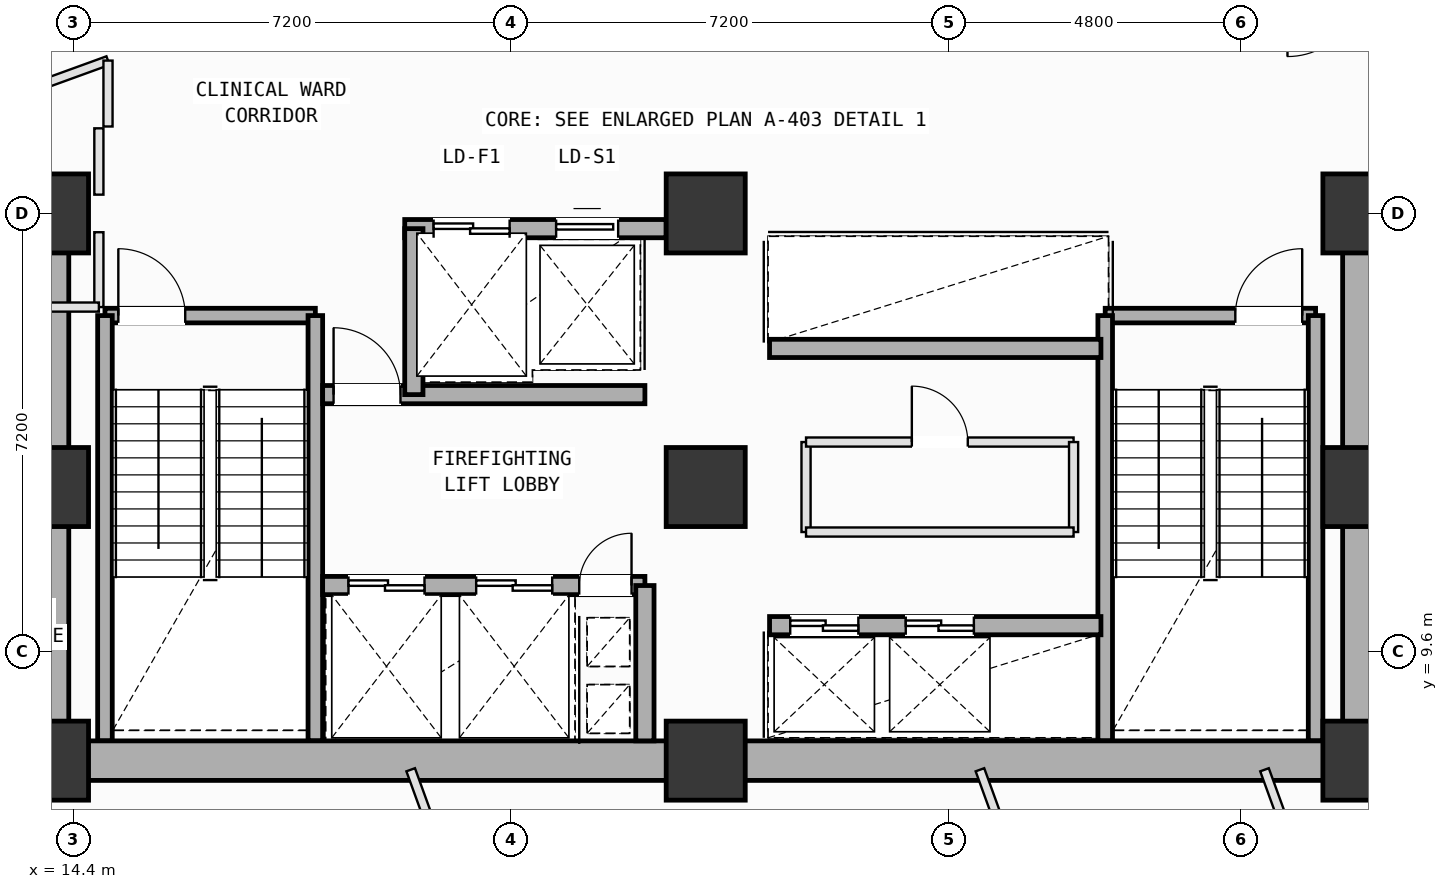
"""IFC4 building model, lengths in metres.
Left out: names, types, materials, properties, quantities, classifications, styles, units other than length and angle.
Written with IfcOpenShell. Run it as: python <this file> out.ifc"""

import sys

from ifc_helpers import new_model, si_unit, direction, frame, frame_2d, origin, origin_2d, place, context, subcontext, project, spatial, rectangle, extrude, element, fill, save


model = new_model("IFC4")
c1 = context("Model", 3, precision=1e-05, world=origin(), true_north=direction((0.0, 1.0)))
c2 = subcontext(c1, "Body", "Model", "MODEL_VIEW")
j1 = project(units=[si_unit("LENGTHUNIT", "METRE"), si_unit("PLANEANGLEUNIT", "RADIAN")], contexts=[c1])
p1 = place(None, origin())
s1 = spatial("IfcSite", under=j1, at=p1, CompositionType="ELEMENT")
p2 = place(p1, origin())
s2 = spatial("IfcBuilding", under=s1, at=p2, CompositionType="ELEMENT")
p3 = place(p2, frame((0.0, 0.0, 108.4)))
s3 = spatial("IfcBuildingStorey", under=s2, at=p3, CompositionType="ELEMENT", Elevation=108.4)
for number, where, z_axis, x_axis in (
    (1, (14.0, 7.8, 0.0), (0.0, 0.0, 1.0), (1.0, 0.0, 0.0)),
    (2, (14.0, 12.3, 0.0), (0.0, 0.0, 1.0), (1.0, 0.0, 0.0)),
    (3, (14.0, 16.8, 0.0), (0.0, 0.0, 1.0), (1.0, 0.0, 0.0)),
    (4, (24.8, 7.8, 0.0), (0.0, 0.0, 1.0), (1.0, 0.0, 0.0)),
    (5, (24.8, 12.3, 0.0), (0.0, 0.0, 1.0), (1.0, 0.0, 0.0)),
    (6, (24.8, 16.8, 0.0), (0.0, 0.0, 1.0), (1.0, 0.0, 0.0)),
    (7, (35.6, 7.8, 0.0), (0.0, 0.0, 1.0), (1.0, 0.0, 0.0)),
    (8, (35.6, 12.3, 0.0), (0.0, 0.0, 1.0), (1.0, 0.0, 0.0)),
    (9, (35.6, 16.8, 0.0), (0.0, 0.0, 1.0), (1.0, 0.0, 0.0)),
):
    element("IfcColumn", number, at=place(p3, frame(where, z_axis=z_axis, x_axis=x_axis)), inside=s3, PredefinedType="COLUMN", context=c2, shape_type="SweptSolid", body=[
        extrude(rectangle(XDim=1.3, YDim=1.3, at=origin_2d()), origin(), (0.0, 0.0, 1.0), 4.0),
    ])
p4 = place(p3, frame((14.92, 15.12, 0.0), z_axis=(0.0, 0.0, 1.0), x_axis=(1.0, 0.0, 0.0)))
e10 = element("IfcWall", 10, at=p4, inside=s3, PredefinedType="SOLIDWALL", context=c2, shape_type="SweptSolid", body=[
    extrude(rectangle(XDim=3.46, YDim=0.24, at=frame_2d((1.73, 0.0))), origin(), (0.0, 0.0, 1.0), 3.78),
])
p5 = place(p4, frame((0.22, 0.0, 0.0)))
e11 = element("IfcOpeningElement", 11, at=p5, cuts=e10, PredefinedType="OPENING", context=c2, shape_type="SweptSolid", body=[
    extrude(rectangle(XDim=1.1, YDim=2.15, at=frame_2d((0.55, 1.075))), frame((0.0, 0.13, 0.0), z_axis=(0.0, -1.0, 0.0), x_axis=(1.0, 0.0, 0.0)), (0.0, 0.0, 1.0), 0.26),
])
for number, where, z_axis, x_axis in (
    (12, (18.38, 15.12, 0.0), (0.0, 0.0, 1.0), (0.0, -1.0, 0.0)),
    (13, (14.92, 8.125, 0.0), (0.0, 0.0, 1.0), (0.0, 1.0, 0.0)),
):
    element("IfcWall", number, at=place(p3, frame(where, z_axis=z_axis, x_axis=x_axis)), inside=s3, PredefinedType="SOLIDWALL", context=c2, shape_type="SweptSolid", body=[
        extrude(rectangle(XDim=6.995, YDim=0.24, at=frame_2d((3.498, 0.0))), origin(), (0.0, 0.0, 1.0), 3.78),
    ])
p6 = place(p3, frame((31.37, 15.12, 0.0), z_axis=(0.0, 0.0, 1.0), x_axis=(1.0, 0.0, 0.0)))
e14 = element("IfcWall", 14, at=p6, inside=s3, PredefinedType="SOLIDWALL", context=c2, shape_type="SweptSolid", body=[
    extrude(rectangle(XDim=3.46, YDim=0.24, at=frame_2d((1.73, 0.0))), origin(), (0.0, 0.0, 1.0), 3.78),
])
p7 = place(p6, frame((2.14, 0.0, 0.0)))
e15 = element("IfcOpeningElement", 15, at=p7, cuts=e14, PredefinedType="OPENING", context=c2, shape_type="SweptSolid", body=[
    extrude(rectangle(XDim=1.1, YDim=2.15, at=frame_2d((0.55, 1.075))), frame((0.0, 0.13, 0.0), z_axis=(0.0, -1.0, 0.0), x_axis=(1.0, 0.0, 0.0)), (0.0, 0.0, 1.0), 0.26),
])
for number, where, z_axis, x_axis in (
    (16, (34.83, 15.12, 0.0), (0.0, 0.0, 1.0), (0.0, -1.0, 0.0)),
    (17, (31.37, 8.125, 0.0), (0.0, 0.0, 1.0), (0.0, 1.0, 0.0)),
):
    element("IfcWall", number, at=place(p3, frame(where, z_axis=z_axis, x_axis=x_axis)), inside=s3, PredefinedType="SOLIDWALL", context=c2, shape_type="SweptSolid", body=[
        extrude(rectangle(XDim=6.995, YDim=0.24, at=frame_2d((3.498, 0.0))), origin(), (0.0, 0.0, 1.0), 3.78),
    ])
for number, where, z_axis, x_axis in (
    (18, (14.0, 7.8, 0.0), (0.0, 0.0, 1.0), (1.0, 0.0, 0.0)),
    (19, (24.8, 7.8, 0.0), (0.0, 0.0, 1.0), (1.0, 0.0, 0.0)),
):
    element("IfcWall", number, at=place(p3, frame(where, z_axis=z_axis, x_axis=x_axis)), inside=s3, PredefinedType="SHEAR", context=c2, shape_type="SweptSolid", body=[
        extrude(rectangle(XDim=10.8, YDim=0.65, at=frame_2d((5.4, 0.0))), origin(), (0.0, 0.0, 1.0), 3.78),
    ])
for number, where, z_axis, x_axis in (
    (20, (35.6, 7.8, 0.0), (0.0, 0.0, 1.0), (0.0, 1.0, 0.0)),
    (21, (14.0, 16.8, 0.0), (0.0, 0.0, 1.0), (0.0, -1.0, 0.0)),
):
    element("IfcWall", number, at=place(p3, frame(where, z_axis=z_axis, x_axis=x_axis)), inside=s3, PredefinedType="SHEAR", context=c2, shape_type="SweptSolid", body=[
        extrude(rectangle(XDim=9.0, YDim=0.65, at=frame_2d((4.5, 0.0))), origin(), (0.0, 0.0, 1.0), 3.78),
    ])
p8 = place(p3, frame((19.85, 16.55, 0.0), z_axis=(0.0, 0.0, 1.0), x_axis=(1.0, 0.0, 0.0)))
e22 = element("IfcWall", 22, at=p8, inside=s3, PredefinedType="SOLIDWALL", context=c2, shape_type="SweptSolid", body=[
    extrude(rectangle(XDim=4.3, YDim=0.3, at=frame_2d((2.15, 0.0))), origin(), (0.0, 0.0, 1.0), 3.78),
])
p9 = place(p8, frame((0.475, 0.0, 0.0)))
e23 = element("IfcOpeningElement", 23, at=p9, cuts=e22, PredefinedType="OPENING", context=c2, shape_type="SweptSolid", body=[
    extrude(rectangle(XDim=1.25, YDim=2.18, at=frame_2d((0.625, 1.09))), frame((0.0, 0.16, 0.0), z_axis=(0.0, -1.0, 0.0), x_axis=(1.0, 0.0, 0.0)), (0.0, 0.0, 1.0), 0.32),
])
p10 = place(p8, frame((2.49, 0.0, 0.0)))
e24 = element("IfcOpeningElement", 24, at=p10, cuts=e22, PredefinedType="OPENING", context=c2, shape_type="SweptSolid", body=[
    extrude(rectangle(XDim=1.02, YDim=2.12, at=frame_2d((0.51, 1.06))), frame((0.0, 0.16, 0.0), z_axis=(0.0, -1.0, 0.0), x_axis=(1.0, 0.0, 0.0)), (0.0, 0.0, 1.0), 0.32),
])
p11 = place(p3, frame((18.5, 10.68, 0.0), z_axis=(0.0, 0.0, 1.0), x_axis=(1.0, 0.0, 0.0)))
e25 = element("IfcWall", 25, at=p11, inside=s3, PredefinedType="SOLIDWALL", context=c2, shape_type="SweptSolid", body=[
    extrude(rectangle(XDim=5.3, YDim=0.3, at=frame_2d((2.65, 0.0))), origin(), (0.0, 0.0, 1.0), 3.78),
])
p12 = place(p11, frame((4.22, 0.0, 0.0)))
e26 = element("IfcOpeningElement", 26, at=p12, cuts=e25, PredefinedType="OPENING", context=c2, shape_type="SweptSolid", body=[
    extrude(rectangle(XDim=0.86, YDim=2.06, at=frame_2d((0.43, 1.03))), frame((0.0, 0.16, 0.0), z_axis=(0.0, -1.0, 0.0), x_axis=(1.0, 0.0, 0.0)), (0.0, 0.0, 1.0), 0.32),
])
p13 = place(p11, frame((0.425, 0.0, 0.0)))
e27 = element("IfcOpeningElement", 27, at=p13, cuts=e25, PredefinedType="OPENING", context=c2, shape_type="SweptSolid", body=[
    extrude(rectangle(XDim=1.25, YDim=2.18, at=frame_2d((0.625, 1.09))), frame((0.0, 0.16, 0.0), z_axis=(0.0, -1.0, 0.0), x_axis=(1.0, 0.0, 0.0)), (0.0, 0.0, 1.0), 0.32),
])
p14 = place(p11, frame((2.525, 0.0, 0.0)))
e28 = element("IfcOpeningElement", 28, at=p14, cuts=e25, PredefinedType="OPENING", context=c2, shape_type="SweptSolid", body=[
    extrude(rectangle(XDim=1.25, YDim=2.18, at=frame_2d((0.625, 1.09))), frame((0.0, 0.16, 0.0), z_axis=(0.0, -1.0, 0.0), x_axis=(1.0, 0.0, 0.0)), (0.0, 0.0, 1.0), 0.32),
])
p15 = place(p3, frame((18.5, 13.82, 0.0), z_axis=(0.0, 0.0, 1.0), x_axis=(1.0, 0.0, 0.0)))
e29 = element("IfcWall", 29, at=p15, inside=s3, PredefinedType="SOLIDWALL", context=c2, shape_type="SweptSolid", body=[
    extrude(rectangle(XDim=5.3, YDim=0.3, at=frame_2d((2.65, 0.0))), origin(), (0.0, 0.0, 1.0), 3.78),
])
p16 = place(p15, frame((0.18, 0.0, 0.0)))
e30 = element("IfcOpeningElement", 30, at=p16, cuts=e29, PredefinedType="OPENING", context=c2, shape_type="SweptSolid", body=[
    extrude(rectangle(XDim=1.1, YDim=2.15, at=frame_2d((0.55, 1.075))), frame((0.0, 0.16, 0.0), z_axis=(0.0, -1.0, 0.0), x_axis=(1.0, 0.0, 0.0)), (0.0, 0.0, 1.0), 0.32),
])
p17 = place(p3, frame((23.8, 8.125, 0.0), z_axis=(0.0, 0.0, 1.0), x_axis=(0.0, 1.0, 0.0)))
e31 = element("IfcWall", 31, at=p17, inside=s3, PredefinedType="SOLIDWALL", context=c2, shape_type="SweptSolid", body=[
    extrude(rectangle(XDim=2.555, YDim=0.3, at=frame_2d((1.277, 0.0))), origin(), (0.0, 0.0, 1.0), 3.78),
])
p18 = place(p3, frame((20.0, 13.82, 0.0), z_axis=(0.0, 0.0, 1.0), x_axis=(0.0, 1.0, 0.0)))
e32 = element("IfcWall", 32, at=p18, inside=s3, PredefinedType="SOLIDWALL", context=c2, shape_type="SweptSolid", body=[
    extrude(rectangle(XDim=2.73, YDim=0.3, at=frame_2d((1.365, 0.0))), origin(), (0.0, 0.0, 1.0), 3.78),
])
p19 = place(p3, frame((25.85, 10.02, 0.0), z_axis=(0.0, 0.0, 1.0), x_axis=(1.0, 0.0, 0.0)))
e33 = element("IfcWall", 33, at=p19, inside=s3, PredefinedType="SOLIDWALL", context=c2, shape_type="SweptSolid", body=[
    extrude(rectangle(XDim=5.45, YDim=0.3, at=frame_2d((2.725, 0.0))), origin(), (0.0, 0.0, 1.0), 3.78),
])
p20 = place(p19, frame((0.34, 0.0, 0.0)))
e34 = element("IfcOpeningElement", 34, at=p20, cuts=e33, PredefinedType="OPENING", context=c2, shape_type="SweptSolid", body=[
    extrude(rectangle(XDim=1.12, YDim=2.15, at=frame_2d((0.56, 1.075))), frame((0.0, 0.16, 0.0), z_axis=(0.0, -1.0, 0.0), x_axis=(1.0, 0.0, 0.0)), (0.0, 0.0, 1.0), 0.32),
])
p21 = place(p19, frame((2.24, 0.0, 0.0)))
e35 = element("IfcOpeningElement", 35, at=p21, cuts=e33, PredefinedType="OPENING", context=c2, shape_type="SweptSolid", body=[
    extrude(rectangle(XDim=1.12, YDim=2.15, at=frame_2d((0.56, 1.075))), frame((0.0, 0.16, 0.0), z_axis=(0.0, -1.0, 0.0), x_axis=(1.0, 0.0, 0.0)), (0.0, 0.0, 1.0), 0.32),
])
p22 = place(p3, frame((25.85, 14.58, 0.0), z_axis=(0.0, 0.0, 1.0), x_axis=(1.0, 0.0, 0.0)))
e36 = element("IfcWall", 36, at=p22, inside=s3, PredefinedType="SOLIDWALL", context=c2, shape_type="SweptSolid", body=[
    extrude(rectangle(XDim=5.45, YDim=0.3, at=frame_2d((2.725, 0.0))), origin(), (0.0, 0.0, 1.0), 3.78),
])
p23 = place(p3, frame((26.45, 11.56, 0.0), z_axis=(0.0, 0.0, 1.0), x_axis=(0.0, 1.0, 0.0)))
e37 = element("IfcWall", 37, at=p23, inside=s3, PredefinedType="PARTITIONING", context=c2, shape_type="SweptSolid", body=[
    extrude(rectangle(XDim=1.48, YDim=0.15, at=frame_2d((0.74, 0.0))), origin(), (0.0, 0.0, 1.0), 3.78),
])
p24 = place(p3, frame((26.45, 13.04, 0.0), z_axis=(0.0, 0.0, 1.0), x_axis=(1.0, 0.0, 0.0)))
e38 = element("IfcWall", 38, at=p24, inside=s3, PredefinedType="PARTITIONING", context=c2, shape_type="SweptSolid", body=[
    extrude(rectangle(XDim=4.4, YDim=0.15, at=frame_2d((2.2, 0.0))), origin(), (0.0, 0.0, 1.0), 3.78),
])
p25 = place(p24, frame((1.74, 0.0, 0.0)))
e39 = element("IfcOpeningElement", 39, at=p25, cuts=e38, PredefinedType="OPENING", context=c2, shape_type="SweptSolid", body=[
    extrude(rectangle(XDim=0.92, YDim=2.1, at=frame_2d((0.46, 1.05))), frame((0.0, 0.085, 0.0), z_axis=(0.0, -1.0, 0.0), x_axis=(1.0, 0.0, 0.0)), (0.0, 0.0, 1.0), 0.17),
])
p26 = place(p3, frame((30.85, 13.04, 0.0), z_axis=(0.0, 0.0, 1.0), x_axis=(0.0, -1.0, 0.0)))
e40 = element("IfcWall", 40, at=p26, inside=s3, PredefinedType="PARTITIONING", context=c2, shape_type="SweptSolid", body=[
    extrude(rectangle(XDim=1.48, YDim=0.15, at=frame_2d((0.74, 0.0))), origin(), (0.0, 0.0, 1.0), 3.78),
])
p27 = place(p3, frame((30.85, 11.56, 0.0), z_axis=(0.0, 0.0, 1.0), x_axis=(-1.0, 0.0, 0.0)))
e41 = element("IfcWall", 41, at=p27, inside=s3, PredefinedType="PARTITIONING", context=c2, shape_type="SweptSolid", body=[
    extrude(rectangle(XDim=4.4, YDim=0.15, at=frame_2d((2.2, 0.0))), origin(), (0.0, 0.0, 1.0), 3.78),
])
p28 = place(p3, frame((19.948, 7.65, 0.0), z_axis=(0.0, 0.0, 1.0), x_axis=(0.341159632503, -0.940005375065, 0.0)))
e42 = element("IfcWall", 42, at=p28, inside=s3, PredefinedType="PARTITIONING", context=c2, shape_type="SweptSolid", body=[
    extrude(rectangle(XDim=10.652, YDim=0.15, at=frame_2d((5.326, 0.0))), origin(), (0.0, 0.0, 1.0), 3.78),
])
p29 = place(p3, frame((29.31, 7.65, 0.0), z_axis=(0.0, 0.0, 1.0), x_axis=(0.341041356656, -0.940048292935, 0.0)))
e43 = element("IfcWall", 43, at=p29, inside=s3, PredefinedType="PARTITIONING", context=c2, shape_type="SweptSolid", body=[
    extrude(rectangle(XDim=7.823, YDim=0.15, at=frame_2d((3.912, 0.0))), origin(), (0.0, 0.0, 1.0), 3.78),
])
p30 = place(p29, frame((3.641, 0.0, 0.0)))
e44 = element("IfcOpeningElement", 44, at=p30, cuts=e43, PredefinedType="OPENING", context=c2, shape_type="SweptSolid", body=[
    extrude(rectangle(XDim=0.86, YDim=2.06, at=frame_2d((0.43, 1.03))), frame((0.0, 0.085, 0.0), z_axis=(0.0, -1.0, 0.0), x_axis=(1.0, 0.0, 0.0)), (0.0, 0.0, 1.0), 0.17),
])
p31 = place(p3, frame((33.99, 7.65, 0.0), z_axis=(0.0, 0.0, 1.0), x_axis=(0.341261367951, -0.939968445611, 0.0)))
e45 = element("IfcWall", 45, at=p31, inside=s3, PredefinedType="PARTITIONING", context=c2, shape_type="SweptSolid", body=[
    extrude(rectangle(XDim=5.861, YDim=0.15, at=frame_2d((2.93, 0.0))), origin(), (0.0, 0.0, 1.0), 3.78),
])
p32 = place(p31, frame((2.66, 0.0, 0.0)))
e46 = element("IfcOpeningElement", 46, at=p32, cuts=e45, PredefinedType="OPENING", context=c2, shape_type="SweptSolid", body=[
    extrude(rectangle(XDim=0.86, YDim=2.06, at=frame_2d((0.43, 1.03))), frame((0.0, 0.085, 0.0), z_axis=(0.0, -1.0, 0.0), x_axis=(1.0, 0.0, 0.0)), (0.0, 0.0, 1.0), 0.17),
])
p33 = place(p3, frame((35.6, 7.5, 0.0), z_axis=(0.0, 0.0, 1.0), x_axis=(1.0, 0.0, 0.0)))
e47 = element("IfcWall", 47, at=p33, inside=s3, PredefinedType="PARTITIONING", context=c2, shape_type="SweptSolid", body=[
    extrude(rectangle(XDim=0.55, YDim=0.15, at=frame_2d((0.275, 0.0))), origin(), (0.0, 0.0, 1.0), 2.965),
])
p34 = place(p3, frame((35.631, 16.494, 0.0), z_axis=(0.0, 0.0, 1.0), x_axis=(0.999975329499, 0.007024271772, 0.0)))
e48 = element("IfcWall", 48, at=p34, inside=s3, PredefinedType="PARTITIONING", context=c2, shape_type="SweptSolid", body=[
    extrude(rectangle(XDim=0.869, YDim=0.15, at=frame_2d((0.435, 0.0))), origin(), (0.0, 0.0, 1.0), 2.965),
])
p35 = place(p3, frame((14.82, 18.2, 0.0), z_axis=(0.0, 0.0, 1.0), x_axis=(0.0, -1.0, 0.0)))
e49 = element("IfcWall", 49, at=p35, inside=s3, PredefinedType="PARTITIONING", context=c2, shape_type="SweptSolid", body=[
    extrude(rectangle(XDim=1.091, YDim=0.15, at=frame_2d((0.545, 0.0))), origin(), (0.0, 0.0, 1.0), 3.78),
])
p36 = place(p3, frame((14.82, 16.491, 0.0), z_axis=(0.0, 0.0, 1.0), x_axis=(0.0, -1.0, 0.0)))
e50 = element("IfcWall", 50, at=p36, inside=s3, PredefinedType="PARTITIONING", context=c2, shape_type="SweptSolid", body=[
    extrude(rectangle(XDim=1.231, YDim=0.15, at=frame_2d((0.615, 0.0))), origin(), (0.0, 0.0, 1.0), 3.78),
])
p37 = place(p3, frame((14.82, 15.26, 0.0), z_axis=(0.0, 0.0, 1.0), x_axis=(-1.0, 0.0, 0.0)))
e51 = element("IfcWall", 51, at=p37, inside=s3, PredefinedType="PARTITIONING", context=c2, shape_type="SweptSolid", body=[
    extrude(rectangle(XDim=1.12, YDim=0.15, at=frame_2d((0.56, 0.0))), origin(), (0.0, 0.0, 1.0), 3.78),
])
p38 = place(p3, frame((7.515, 16.608, 0.0), z_axis=(0.0, 0.0, 1.0), x_axis=(0.939990996675, 0.341199247025, 0.0)))
e52 = element("IfcWall", 52, at=p38, inside=s3, PredefinedType="PARTITIONING", context=c2, shape_type="SweptSolid", body=[
    extrude(rectangle(XDim=7.931, YDim=0.15, at=frame_2d((3.965, 0.0))), origin(), (0.0, 0.0, 1.0), 3.78),
])
p39 = place(p38, frame((3.365, 0.0, 0.0)))
e53 = element("IfcOpeningElement", 53, at=p39, cuts=e52, PredefinedType="OPENING", context=c2, shape_type="SweptSolid", body=[
    extrude(rectangle(XDim=1.2, YDim=2.15, at=frame_2d((0.6, 1.075))), frame((0.0, 0.085, 0.0), z_axis=(0.0, -1.0, 0.0), x_axis=(1.0, 0.0, 0.0)), (0.0, 0.0, 1.0), 0.17),
])
p40 = place(p3, frame((14.97, 19.314, 0.0), z_axis=(0.0, 0.0, 1.0), x_axis=(0.0, -1.0, 0.0)))
e54 = element("IfcWall", 54, at=p40, inside=s3, PredefinedType="PARTITIONING", context=c2, shape_type="SweptSolid", body=[
    extrude(rectangle(XDim=1.084, YDim=0.15, at=frame_2d((0.542, 0.0))), origin(), (0.0, 0.0, 1.0), 3.78),
])
p41 = place(p5, origin())
e55 = element("IfcDoor", 55, at=p41, inside=s3, OperationType="SINGLE_SWING_LEFT", PredefinedType="DOOR", context=c2, shape_type="SweptSolid", body=[
    extrude(rectangle(XDim=1.1, YDim=2.15, at=frame_2d((0.55, 1.075))), frame((0.0, 0.025, 0.0), z_axis=(0.0, -1.0, 0.0), x_axis=(1.0, 0.0, 0.0)), (0.0, 0.0, 1.0), 0.05),
])
fill(e11, e55)
p42 = place(p7, origin())
e56 = element("IfcDoor", 56, at=p42, inside=s3, OperationType="SINGLE_SWING_RIGHT", PredefinedType="DOOR", context=c2, shape_type="SweptSolid", body=[
    extrude(rectangle(XDim=1.1, YDim=2.15, at=frame_2d((0.55, 1.075))), frame((0.0, 0.025, 0.0), z_axis=(0.0, -1.0, 0.0), x_axis=(1.0, 0.0, 0.0)), (0.0, 0.0, 1.0), 0.05),
])
fill(e15, e56)
p43 = place(p12, origin())
e57 = element("IfcDoor", 57, at=p43, inside=s3, OperationType="SINGLE_SWING_RIGHT", PredefinedType="DOOR", context=c2, shape_type="SweptSolid", body=[
    extrude(rectangle(XDim=0.86, YDim=2.06, at=frame_2d((0.43, 1.03))), frame((0.0, 0.025, 0.0), z_axis=(0.0, -1.0, 0.0), x_axis=(1.0, 0.0, 0.0)), (0.0, 0.0, 1.0), 0.05),
])
fill(e26, e57)
p44 = place(p16, origin())
e58 = element("IfcDoor", 58, at=p44, inside=s3, OperationType="SINGLE_SWING_LEFT", PredefinedType="DOOR", context=c2, shape_type="SweptSolid", body=[
    extrude(rectangle(XDim=1.1, YDim=2.15, at=frame_2d((0.55, 1.075))), frame((0.0, 0.025, 0.0), z_axis=(0.0, -1.0, 0.0), x_axis=(1.0, 0.0, 0.0)), (0.0, 0.0, 1.0), 0.05),
])
fill(e30, e58)
p45 = place(p13, origin())
e59 = element("IfcDoor", 59, at=p45, inside=s3, OperationType="DOUBLE_DOOR_SLIDING", PredefinedType="DOOR", context=c2, shape_type="SweptSolid", body=[
    extrude(rectangle(XDim=1.25, YDim=2.18, at=frame_2d((0.625, 1.09))), frame((0.0, 0.025, 0.0), z_axis=(0.0, -1.0, 0.0), x_axis=(1.0, 0.0, 0.0)), (0.0, 0.0, 1.0), 0.05),
])
fill(e27, e59)
p46 = place(p14, origin())
e60 = element("IfcDoor", 60, at=p46, inside=s3, OperationType="DOUBLE_DOOR_SLIDING", PredefinedType="DOOR", context=c2, shape_type="SweptSolid", body=[
    extrude(rectangle(XDim=1.25, YDim=2.18, at=frame_2d((0.625, 1.09))), frame((0.0, 0.025, 0.0), z_axis=(0.0, -1.0, 0.0), x_axis=(1.0, 0.0, 0.0)), (0.0, 0.0, 1.0), 0.05),
])
fill(e28, e60)
p47 = place(p20, origin())
e61 = element("IfcDoor", 61, at=p47, inside=s3, OperationType="DOUBLE_DOOR_SLIDING", PredefinedType="DOOR", context=c2, shape_type="SweptSolid", body=[
    extrude(rectangle(XDim=1.12, YDim=2.15, at=frame_2d((0.56, 1.075))), frame((0.0, 0.025, 0.0), z_axis=(0.0, -1.0, 0.0), x_axis=(1.0, 0.0, 0.0)), (0.0, 0.0, 1.0), 0.05),
])
fill(e34, e61)
p48 = place(p21, origin())
e62 = element("IfcDoor", 62, at=p48, inside=s3, OperationType="DOUBLE_DOOR_SLIDING", PredefinedType="DOOR", context=c2, shape_type="SweptSolid", body=[
    extrude(rectangle(XDim=1.12, YDim=2.15, at=frame_2d((0.56, 1.075))), frame((0.0, 0.025, 0.0), z_axis=(0.0, -1.0, 0.0), x_axis=(1.0, 0.0, 0.0)), (0.0, 0.0, 1.0), 0.05),
])
fill(e35, e62)
p49 = place(p9, origin())
e63 = element("IfcDoor", 63, at=p49, inside=s3, OperationType="DOUBLE_DOOR_SLIDING", PredefinedType="DOOR", context=c2, shape_type="SweptSolid", body=[
    extrude(rectangle(XDim=1.25, YDim=2.18, at=frame_2d((0.625, 1.09))), frame((0.0, 0.025, 0.0), z_axis=(0.0, -1.0, 0.0), x_axis=(1.0, 0.0, 0.0)), (0.0, 0.0, 1.0), 0.05),
])
fill(e23, e63)
p50 = place(p10, origin())
e64 = element("IfcDoor", 64, at=p50, inside=s3, OperationType="SLIDING_TO_LEFT", PredefinedType="DOOR", context=c2, shape_type="SweptSolid", body=[
    extrude(rectangle(XDim=1.02, YDim=2.12, at=frame_2d((0.51, 1.06))), frame((0.0, 0.025, 0.0), z_axis=(0.0, -1.0, 0.0), x_axis=(1.0, 0.0, 0.0)), (0.0, 0.0, 1.0), 0.05),
])
fill(e24, e64)
p51 = place(p25, origin())
e65 = element("IfcDoor", 65, at=p51, inside=s3, OperationType="SINGLE_SWING_LEFT", PredefinedType="DOOR", context=c2, shape_type="SweptSolid", body=[
    extrude(rectangle(XDim=0.92, YDim=2.1, at=frame_2d((0.46, 1.05))), frame((0.0, 0.025, 0.0), z_axis=(0.0, -1.0, 0.0), x_axis=(1.0, 0.0, 0.0)), (0.0, 0.0, 1.0), 0.05),
])
fill(e39, e65)
save(model, sys.argv[1])
